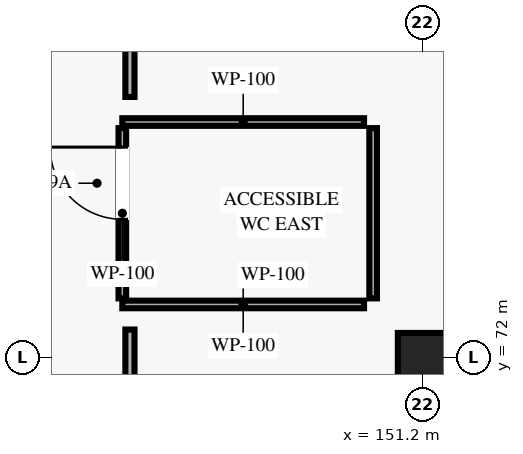
"""IFC4 building model, lengths in metres.
Left out: names, types, materials, properties, quantities, classifications, styles, units other than length and angle.
Written with IfcOpenShell. Run it as: python <this file> out.ifc"""

import sys

from ifc_helpers import new_model, si_unit, direction, frame, frame_2d, origin, origin_2d, place, context, subcontext, project, spatial, rectangle, extrude, element, fill, save


model = new_model("IFC4")
c1 = context("Model", 3, precision=1e-05, world=origin(), true_north=direction((0.0, 1.0)))
c2 = subcontext(c1, "Body", "Model", "MODEL_VIEW")
j1 = project(units=[si_unit("LENGTHUNIT", "METRE"), si_unit("PLANEANGLEUNIT", "RADIAN")], contexts=[c1])
p1 = place(None, origin())
s1 = spatial("IfcSite", under=j1, at=p1, CompositionType="ELEMENT")
p2 = place(p1, origin())
s2 = spatial("IfcBuilding", under=s1, at=p2, CompositionType="ELEMENT")
p3 = place(p2, frame((0.0, 0.0, 17.55)))
s3 = spatial("IfcBuildingStorey", under=s2, at=p3, CompositionType="ELEMENT", Elevation=17.55)
p4 = place(p3, frame((151.2, 72.0, 0.0), z_axis=(0.0, 0.0, 1.0), x_axis=(1.0, 0.0, 0.0)))
e1 = element("IfcColumn", 1, at=p4, inside=s3, PredefinedType="COLUMN", context=c2, shape_type="SweptSolid", body=[
    extrude(rectangle(XDim=0.65, YDim=0.65, at=origin_2d()), origin(), (0.0, 0.0, 1.0), 4.05),
])
p5 = place(p3, frame((147.25, 72.78, 0.0), z_axis=(0.0, 0.0, 1.0), x_axis=(0.0, 1.0, 0.0)))
e2 = element("IfcWall", 2, at=p5, inside=s3, PredefinedType="PARTITIONING", context=c2, shape_type="SweptSolid", body=[
    extrude(rectangle(XDim=2.24, YDim=0.1, at=frame_2d((1.12, 0.0))), origin(), (0.0, 0.0, 1.0), 3.83),
])
p6 = place(p5, frame((1.04, 0.0, 0.0)))
e3 = element("IfcOpeningElement", 3, at=p6, cuts=e2, PredefinedType="OPENING", context=c2, shape_type="SweptSolid", body=[
    extrude(rectangle(XDim=0.95, YDim=2.1, at=frame_2d((0.475, 1.05))), frame((0.0, 0.06, 0.0), z_axis=(0.0, -1.0, 0.0), x_axis=(1.0, 0.0, 0.0)), (0.0, 0.0, 1.0), 0.12),
])
for number, where, z_axis, x_axis in (
    (4, (147.25, 72.7, 0.0), (0.0, 0.0, 1.0), (1.0, 0.0, 0.0)),
    (5, (147.25, 75.1, 0.0), (0.0, 0.0, 1.0), (1.0, 0.0, 0.0)),
):
    element("IfcWall", number, at=place(p3, frame(where, z_axis=z_axis, x_axis=x_axis)), inside=s3, PredefinedType="PARTITIONING", context=c2, shape_type="SweptSolid", body=[
        extrude(rectangle(XDim=3.18, YDim=0.1, at=frame_2d((1.59, 0.0))), origin(), (0.0, 0.0, 1.0), 3.83),
    ])
p7 = place(p3, frame((150.55, 72.78, 0.0), z_axis=(0.0, 0.0, 1.0), x_axis=(0.0, 1.0, 0.0)))
e6 = element("IfcWall", 6, at=p7, inside=s3, PredefinedType="PARTITIONING", context=c2, shape_type="SweptSolid", body=[
    extrude(rectangle(XDim=2.24, YDim=0.1, at=frame_2d((1.12, 0.0))), origin(), (0.0, 0.0, 1.0), 3.83),
])
p8 = place(p3, frame((147.35, 57.15, 0.0), z_axis=(0.0, 0.0, 1.0), x_axis=(0.0, 1.0, 0.0)))
e7 = element("IfcWall", 7, at=p8, inside=s3, PredefinedType="PARTITIONING", context=c2, shape_type="SweptSolid", body=[
    extrude(rectangle(XDim=15.22, YDim=0.12, at=frame_2d((7.61, 0.0))), origin(), (0.0, 0.0, 1.0), 3.83),
])
p9 = place(p8, frame((3.255, 0.0, 0.0)))
e8 = element("IfcOpeningElement", 8, at=p9, cuts=e7, PredefinedType="OPENING", context=c2, shape_type="SweptSolid", body=[
    extrude(rectangle(XDim=1.7, YDim=2.2, at=frame_2d((0.85, 1.1))), frame((0.0, 0.07, 0.0), z_axis=(0.0, -1.0, 0.0), x_axis=(1.0, 0.0, 0.0)), (0.0, 0.0, 1.0), 0.14),
])
p10 = place(p3, frame((147.35, 75.43, 0.0), z_axis=(0.0, 0.0, 1.0), x_axis=(0.0, 1.0, 0.0)))
e9 = element("IfcWall", 9, at=p10, inside=s3, PredefinedType="PARTITIONING", context=c2, shape_type="SweptSolid", body=[
    extrude(rectangle(XDim=13.07, YDim=0.12, at=frame_2d((6.535, 0.0))), origin(), (0.0, 0.0, 1.0), 3.83),
])
p11 = place(p6, origin())
e10 = element("IfcDoor", 10, at=p11, inside=s3, OperationType="SINGLE_SWING_RIGHT", PredefinedType="DOOR", context=c2, shape_type="SweptSolid", body=[
    extrude(rectangle(XDim=0.95, YDim=2.1, at=frame_2d((0.475, 1.05))), frame((0.0, 0.025, 0.0), z_axis=(0.0, -1.0, 0.0), x_axis=(1.0, 0.0, 0.0)), (0.0, 0.0, 1.0), 0.05),
])
fill(e3, e10)
save(model, sys.argv[1])
